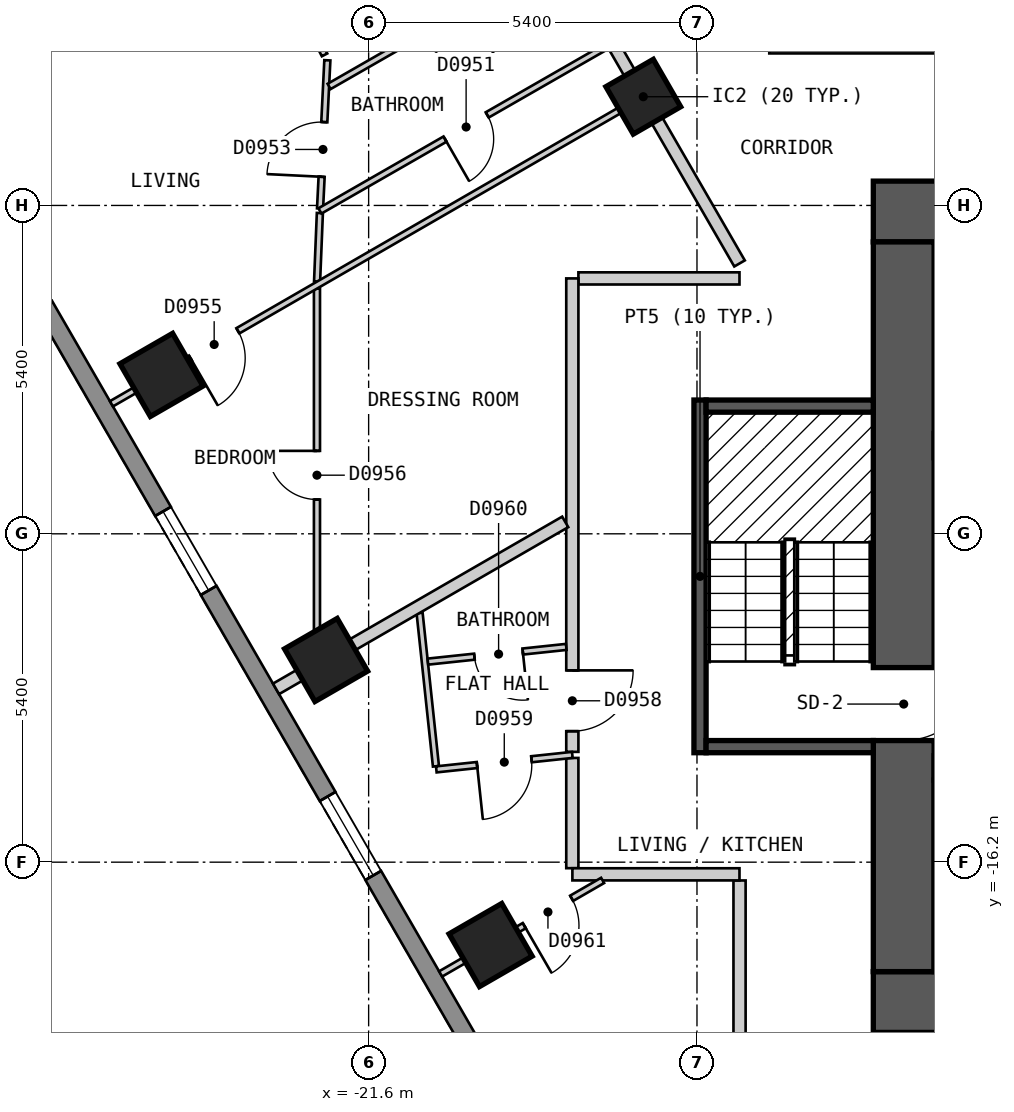
"""IFC4 building model, lengths in metres.
Left out: names, types, materials, properties, quantities, classifications, styles, units other than length and angle.
Written with IfcOpenShell. Run it as: python <this file> out.ifc"""

import sys

from ifc_helpers import new_model, si_unit, direction, frame, frame_2d, origin, origin_2d, place, context, subcontext, project, spatial, polyline, rectangle, outline, extrude, element, fill, save


model = new_model("IFC4")
c1 = context("Model", 3, precision=1e-05, world=origin(), true_north=direction((0.0, 1.0)))
c2 = subcontext(c1, "Body", "Model", "MODEL_VIEW")
j1 = project(units=[si_unit("LENGTHUNIT", "METRE"), si_unit("PLANEANGLEUNIT", "RADIAN")], contexts=[c1])
p1 = place(None, origin())
s1 = spatial("IfcSite", under=j1, at=p1, CompositionType="ELEMENT")
p2 = place(p1, origin())
s2 = spatial("IfcBuilding", under=s1, at=p2, CompositionType="ELEMENT")
p3 = place(p2, frame((0.0, 0.0, 102.0)))
s3 = spatial("IfcBuildingStorey", under=s2, at=p3, CompositionType="ELEMENT", Elevation=102.0)
for number, where, z_axis, x_axis in (
    (1, (-25.007, -8.187, 0.0), (0.0, 0.0, 1.0), (0.5, -0.866, 0.0)),
    (2, (-22.3, -12.875, 0.0), (0.0, 0.0, 1.0), (0.5, -0.866, 0.0)),
    (3, (-19.594, -17.563, 0.0), (0.0, 0.0, 1.0), (0.5, -0.866, 0.0)),
):
    element("IfcColumn", number, at=place(p3, frame(where, z_axis=z_axis, x_axis=x_axis)), inside=s3, PredefinedType="COLUMN", context=c2, shape_type="SweptSolid", body=[
        extrude(rectangle(XDim=1.0, YDim=1.0, at=origin_2d()), origin(), (0.0, 0.0, 1.0), 3.0),
    ])
p4 = place(p3, frame((-17.083, -3.612, 0.0), z_axis=(0.0, 0.0, 1.0), x_axis=(0.5, -0.866025403784, 0.0)))
e4 = element("IfcColumn", 4, at=p4, inside=s3, PredefinedType="COLUMN", context=c2, shape_type="SweptSolid", body=[
    extrude(rectangle(XDim=0.9, YDim=0.9, at=origin_2d()), origin(), (0.0, 0.0, 1.0), 3.0),
])
p5 = place(p3, frame((-13.3, -18.5, 0.0), z_axis=(0.0, 0.0, 1.0), x_axis=(1.0, 0.0, 0.0)))
e5 = element("IfcWall", 5, at=p5, inside=s3, PredefinedType="SHEAR", context=c2, shape_type="SweptSolid", body=[
    extrude(rectangle(XDim=26.6, YDim=1.0, at=frame_2d((13.3, 0.0))), origin(), (0.0, 0.0, 1.0), 2.7),
])
p6 = place(p3, frame((-13.3, -5.5, 0.0), z_axis=(0.0, 0.0, 1.0), x_axis=(1.0, 0.0, 0.0)))
e6 = element("IfcWall", 6, at=p6, inside=s3, PredefinedType="SHEAR", context=c2, shape_type="SweptSolid", body=[
    extrude(rectangle(XDim=26.6, YDim=1.0, at=frame_2d((13.3, 0.0))), origin(), (0.0, 0.0, 1.0), 2.7),
])
p7 = place(p6, frame((23.65, 0.0, 0.0)))
e7 = element("IfcOpeningElement", 7, at=p7, cuts=e6, PredefinedType="OPENING", context=c2, shape_type="SweptSolid", body=[
    extrude(rectangle(XDim=1.2, YDim=2.1, at=frame_2d((0.6, 1.05))), frame((0.0, 0.51, 0.0), z_axis=(0.0, -1.0, 0.0), x_axis=(1.0, 0.0, 0.0)), (0.0, 0.0, 1.0), 1.02),
])
p8 = place(p3, frame((-12.8, -18.0, 0.0), z_axis=(0.0, 0.0, 1.0), x_axis=(0.0, 1.0, 0.0)))
e8 = element("IfcWall", 8, at=p8, inside=s3, PredefinedType="SHEAR", context=c2, shape_type="SweptSolid", body=[
    extrude(rectangle(XDim=12.0, YDim=1.0, at=frame_2d((6.0, 0.0))), origin(), (0.0, 0.0, 1.0), 2.7),
])
p9 = place(p8, frame((3.8, 0.0, 0.0)))
e9 = element("IfcOpeningElement", 9, at=p9, cuts=e8, PredefinedType="OPENING", context=c2, shape_type="SweptSolid", body=[
    extrude(rectangle(XDim=1.2, YDim=2.1, at=frame_2d((0.6, 1.05))), frame((0.0, 0.51, 0.0), z_axis=(0.0, -1.0, 0.0), x_axis=(1.0, 0.0, 0.0)), (0.0, 0.0, 1.0), 1.02),
])
p10 = place(p3, frame((-29.027, -3.425, 0.0), z_axis=(0.0, 0.0, 1.0), x_axis=(0.500035407905, -0.866004960056, 0.0)))
e10 = element("IfcWall", 10, at=p10, inside=s3, PredefinedType="SOLIDWALL", context=c2, shape_type="SweptSolid", body=[
    extrude(outline(polyline([(0.0, -0.15), (23.094, -0.15), (23.014, 0.15), (0.08, 0.15), (0.0, -0.15)])), origin(), (0.0, 0.0, 1.0), 2.7),
])
p11 = place(p10, frame((2.677, 0.0, 0.15)))
e11 = element("IfcOpeningElement", 11, at=p11, cuts=e10, PredefinedType="OPENING", context=c2, shape_type="SweptSolid", body=[
    extrude(rectangle(XDim=1.5, YDim=2.1, at=frame_2d((0.75, 1.05))), frame((0.0, 0.16, 0.0), z_axis=(0.0, -1.0, 0.0), x_axis=(1.0, 0.0, 0.0)), (0.0, 0.0, 1.0), 0.32),
])
p12 = place(p10, frame((8.091, 0.0, 0.15)))
e12 = element("IfcOpeningElement", 12, at=p12, cuts=e10, PredefinedType="OPENING", context=c2, shape_type="SweptSolid", body=[
    extrude(rectangle(XDim=1.5, YDim=2.1, at=frame_2d((0.75, 1.05))), frame((0.0, 0.16, 0.0), z_axis=(0.0, -1.0, 0.0), x_axis=(1.0, 0.0, 0.0)), (0.0, 0.0, 1.0), 0.32),
])
p13 = place(p10, frame((13.504, 0.0, 0.15)))
e13 = element("IfcOpeningElement", 13, at=p13, cuts=e10, PredefinedType="OPENING", context=c2, shape_type="SweptSolid", body=[
    extrude(rectangle(XDim=1.5, YDim=2.1, at=frame_2d((0.75, 1.05))), frame((0.0, 0.16, 0.0), z_axis=(0.0, -1.0, 0.0), x_axis=(1.0, 0.0, 0.0)), (0.0, 0.0, 1.0), 0.32),
])
p14 = place(p10, frame((18.917, 0.0, 0.15)))
e14 = element("IfcOpeningElement", 14, at=p14, cuts=e10, PredefinedType="OPENING", context=c2, shape_type="SweptSolid", body=[
    extrude(rectangle(XDim=1.5, YDim=2.1, at=frame_2d((0.75, 1.05))), frame((0.0, 0.16, 0.0), z_axis=(0.0, -1.0, 0.0), x_axis=(1.0, 0.0, 0.0)), (0.0, 0.0, 1.0), 0.32),
])
p15 = place(p3, frame((-18.533, -1.101, 0.0), z_axis=(0.0, 0.0, 1.0), x_axis=(0.500022085096, -0.866012652573, 0.0)))
e15 = element("IfcWall", 15, at=p15, inside=s3, PredefinedType="PARTITIONING", context=c2, shape_type="SweptSolid", body=[
    extrude(rectangle(XDim=6.066, YDim=0.2, at=frame_2d((3.033, 0.0))), origin(), (0.0, 0.0, 1.0), 2.7),
])
p16 = place(p15, frame((0.532, 0.0, 0.0)))
e16 = element("IfcOpeningElement", 16, at=p16, cuts=e15, PredefinedType="OPENING", context=c2, shape_type="SweptSolid", body=[
    extrude(rectangle(XDim=1.0, YDim=2.1, at=frame_2d((0.5, 1.05))), frame((0.0, 0.11, 0.0), z_axis=(0.0, -1.0, 0.0), x_axis=(1.0, 0.0, 0.0)), (0.0, 0.0, 1.0), 0.22),
])
p17 = place(p3, frame((-15.5, -16.501, 0.0), z_axis=(0.0, 0.0, 1.0), x_axis=(0.0, -1.0, 0.0)))
e17 = element("IfcWall", 17, at=p17, inside=s3, PredefinedType="PARTITIONING", context=c2, shape_type="SweptSolid", body=[
    extrude(rectangle(XDim=4.598, YDim=0.2, at=frame_2d((2.299, 0.0))), origin(), (0.0, 0.0, 1.0), 2.7),
])
p18 = place(p3, frame((-18.25, -14.486, 0.0), z_axis=(0.0, 0.0, 1.0), x_axis=(0.0, -1.0, 0.0)))
e18 = element("IfcWall", 18, at=p18, inside=s3, PredefinedType="PARTITIONING", context=c2, shape_type="SweptSolid", body=[
    extrude(rectangle(XDim=1.813, YDim=0.2, at=frame_2d((0.906, 0.0))), origin(), (0.0, 0.0, 1.0), 2.7),
])
p19 = place(p3, frame((-18.15, -6.6, 0.0), z_axis=(0.0, 0.0, 1.0), x_axis=(1.0, 0.0, 0.0)))
e19 = element("IfcWall", 19, at=p19, inside=s3, PredefinedType="PARTITIONING", context=c2, shape_type="SweptSolid", body=[
    extrude(rectangle(XDim=2.649, YDim=0.2, at=frame_2d((1.324, 0.0))), origin(), (0.0, 0.0, 1.0), 2.7),
])
p20 = place(p3, frame((-18.249, -16.4, 0.0), z_axis=(0.0, 0.0, 1.0), x_axis=(1.0, 0.0, 0.0)))
e20 = element("IfcWall", 20, at=p20, inside=s3, PredefinedType="PARTITIONING", context=c2, shape_type="SweptSolid", body=[
    extrude(rectangle(XDim=2.748, YDim=0.2, at=frame_2d((1.374, 0.0))), origin(), (0.0, 0.0, 1.0), 2.7),
])
p21 = place(p3, frame((-15.011, -2.8, 0.0), z_axis=(0.0, 0.0, 1.0), x_axis=(1.0, 0.0, 0.0)))
e21 = element("IfcWall", 21, at=p21, inside=s3, PredefinedType="PARTITIONING", context=c2, shape_type="SweptSolid", body=[
    extrude(rectangle(XDim=7.982, YDim=0.2, at=frame_2d((3.991, 0.0))), origin(), (0.0, 0.0, 1.0), 2.7),
])
p22 = place(p3, frame((-18.25, -14.386, 0.0), z_axis=(0.0, 0.0, 1.0), x_axis=(0.0, 1.0, 0.0)))
e22 = element("IfcWall", 22, at=p22, inside=s3, PredefinedType="PARTITIONING", context=c2, shape_type="SweptSolid", body=[
    extrude(rectangle(XDim=7.786, YDim=0.2, at=frame_2d((3.893, 0.0))), origin(), (0.0, 0.0, 1.0), 2.7),
])
p23 = place(p22, frame((0.34, 0.0, 0.0)))
e23 = element("IfcOpeningElement", 23, at=p23, cuts=e22, PredefinedType="OPENING", context=c2, shape_type="SweptSolid", body=[
    extrude(rectangle(XDim=1.0, YDim=2.1, at=frame_2d((0.5, 1.05))), frame((0.0, 0.11, 0.0), z_axis=(0.0, -1.0, 0.0), x_axis=(1.0, 0.0, 0.0)), (0.0, 0.0, 1.0), 0.22),
])
p24 = place(p3, frame((-23.289, -1.054, 0.0), z_axis=(0.0, 0.0, 1.0), x_axis=(0.458226112305, -0.888835659726, 0.0)))
e24 = element("IfcWall", 24, at=p24, inside=s3, PredefinedType="PARTITIONING", context=c2, shape_type="SweptSolid", body=[
    extrude(rectangle(XDim=2.104, YDim=0.1, at=frame_2d((1.052, 0.0))), origin(), (0.0, 0.0, 1.0), 2.7),
])
p25 = place(p3, frame((-20.762, -12.102, 0.0), z_axis=(0.0, 0.0, 1.0), x_axis=(0.106118300401, -0.994353511745, 0.0)))
e25 = element("IfcWall", 25, at=p25, inside=s3, PredefinedType="PARTITIONING", context=c2, shape_type="SweptSolid", body=[
    extrude(rectangle(XDim=2.535, YDim=0.1, at=frame_2d((1.268, 0.0))), origin(), (0.0, 0.0, 1.0), 2.7),
])
p26 = place(p3, frame((-20.626, -12.902, 0.0), z_axis=(0.0, 0.0, 1.0), x_axis=(0.994385570266, 0.105817473257, 0.0)))
e26 = element("IfcWall", 26, at=p26, inside=s3, PredefinedType="PARTITIONING", context=c2, shape_type="SweptSolid", body=[
    extrude(rectangle(XDim=2.289, YDim=0.1, at=frame_2d((1.145, 0.0))), origin(), (0.0, 0.0, 1.0), 2.7),
])
p27 = place(p26, frame((0.77, 0.0, 0.0)))
e27 = element("IfcOpeningElement", 27, at=p27, cuts=e26, PredefinedType="OPENING", context=c2, shape_type="SweptSolid", body=[
    extrude(rectangle(XDim=0.8, YDim=2.1, at=frame_2d((0.4, 1.05))), frame((0.0, 0.06, 0.0), z_axis=(0.0, -1.0, 0.0), x_axis=(1.0, 0.0, 0.0)), (0.0, 0.0, 1.0), 0.12),
])
p28 = place(p3, frame((-20.487, -14.674, 0.0), z_axis=(0.0, 0.0, 1.0), x_axis=(0.994386484046, 0.105808885948, 0.0)))
e28 = element("IfcWall", 28, at=p28, inside=s3, PredefinedType="PARTITIONING", context=c2, shape_type="SweptSolid", body=[
    extrude(rectangle(XDim=2.25, YDim=0.1, at=frame_2d((1.125, 0.0))), origin(), (0.0, 0.0, 1.0), 2.7),
])
p29 = place(p28, frame((0.674, 0.0, 0.0)))
e29 = element("IfcOpeningElement", 29, at=p29, cuts=e28, PredefinedType="OPENING", context=c2, shape_type="SweptSolid", body=[
    extrude(rectangle(XDim=0.9, YDim=2.1, at=frame_2d((0.45, 1.05))), frame((0.0, 0.06, 0.0), z_axis=(0.0, -1.0, 0.0), x_axis=(1.0, 0.0, 0.0)), (0.0, 0.0, 1.0), 0.12),
])
p30 = place(p3, frame((-22.399, -5.45, 0.0), z_axis=(0.0, 0.0, 1.0), x_axis=(0.049129140995, 0.998792434646, 0.0)))
e30 = element("IfcWall", 30, at=p30, inside=s3, PredefinedType="PARTITIONING", context=c2, shape_type="SweptSolid", body=[
    extrude(rectangle(XDim=2.44, YDim=0.1, at=frame_2d((1.22, 0.0))), origin(), (0.0, 0.0, 1.0), 2.7),
])
p31 = place(p30, frame((0.522, 0.0, 0.0)))
e31 = element("IfcOpeningElement", 31, at=p31, cuts=e30, PredefinedType="OPENING", context=c2, shape_type="SweptSolid", body=[
    extrude(rectangle(XDim=0.9, YDim=2.1, at=frame_2d((0.45, 1.05))), frame((0.0, 0.06, 0.0), z_axis=(0.0, -1.0, 0.0), x_axis=(1.0, 0.0, 0.0)), (0.0, 0.0, 1.0), 0.12),
])
p32 = place(p3, frame((-22.448, -6.651, 0.0), z_axis=(0.0, 0.0, 1.0), x_axis=(0.040729401597, 0.99917021365, 0.0)))
e32 = element("IfcWall", 32, at=p32, inside=s3, PredefinedType="PARTITIONING", context=c2, shape_type="SweptSolid", body=[
    extrude(rectangle(XDim=1.127, YDim=0.1, at=frame_2d((0.563, 0.0))), origin(), (0.0, 0.0, 1.0), 2.7),
])
p33 = place(p3, frame((-22.45, -12.846, 0.0), z_axis=(0.0, 0.0, 1.0), x_axis=(0.0, 1.0, 0.0)))
e33 = element("IfcWall", 33, at=p33, inside=s3, PredefinedType="PARTITIONING", context=c2, shape_type="SweptSolid", body=[
    extrude(rectangle(XDim=6.078, YDim=0.1, at=frame_2d((3.039, 0.0))), origin(), (0.0, 0.0, 1.0), 2.7),
])
p34 = place(p33, frame((2.61, 0.0, 0.0)))
e34 = element("IfcOpeningElement", 34, at=p34, cuts=e33, PredefinedType="OPENING", context=c2, shape_type="SweptSolid", body=[
    extrude(rectangle(XDim=0.8, YDim=2.1, at=frame_2d((0.4, 1.05))), frame((0.0, 0.06, 0.0), z_axis=(0.0, -1.0, 0.0), x_axis=(1.0, 0.0, 0.0)), (0.0, 0.0, 1.0), 0.12),
])
p35 = place(p3, frame((-20.416, -18.038, 0.0), z_axis=(0.0, 0.0, 1.0), x_axis=(0.866026989333, 0.499997253739, 0.0)))
e35 = element("IfcWall", 35, at=p35, inside=s3, PredefinedType="PARTITIONING", context=c2, shape_type="SweptSolid", body=[
    extrude(rectangle(XDim=3.076, YDim=0.1, at=frame_2d((1.538, 0.0))), origin(), (0.0, 0.0, 1.0), 2.7),
])
p36 = place(p35, frame((1.588, 0.0, 0.0)))
e36 = element("IfcOpeningElement", 36, at=p36, cuts=e35, PredefinedType="OPENING", context=c2, shape_type="SweptSolid", body=[
    extrude(rectangle(XDim=0.9, YDim=2.1, at=frame_2d((0.45, 1.05))), frame((0.0, 0.06, 0.0), z_axis=(0.0, -1.0, 0.0), x_axis=(1.0, 0.0, 0.0)), (0.0, 0.0, 1.0), 0.12),
])
p37 = place(p3, frame((-25.83, -8.662, 0.0), z_axis=(0.0, 0.0, 1.0), x_axis=(0.866022959057, 0.500004234368, 0.0)))
e37 = element("IfcWall", 37, at=p37, inside=s3, PredefinedType="PARTITIONING", context=c2, shape_type="SweptSolid", body=[
    extrude(rectangle(XDim=10.0, YDim=0.1, at=frame_2d((5.0, 0.0))), origin(), (0.0, 0.0, 1.0), 2.7),
])
p38 = place(p37, frame((1.501, 0.0, 0.0)))
e38 = element("IfcOpeningElement", 38, at=p38, cuts=e37, PredefinedType="OPENING", context=c2, shape_type="SweptSolid", body=[
    extrude(rectangle(XDim=0.9, YDim=2.1, at=frame_2d((0.45, 1.05))), frame((0.0, 0.06, 0.0), z_axis=(0.0, -1.0, 0.0), x_axis=(1.0, 0.0, 0.0)), (0.0, 0.0, 1.0), 0.12),
])
p39 = place(p3, frame((-22.401, -5.49, 0.0), z_axis=(0.0, 0.0, 1.0), x_axis=(0.867314404256, 0.497760709749, 0.0)))
e39 = element("IfcWall", 39, at=p39, inside=s3, PredefinedType="PARTITIONING", context=c2, shape_type="SweptSolid", body=[
    extrude(rectangle(XDim=5.444, YDim=0.1, at=frame_2d((2.722, 0.0))), origin(), (0.0, 0.0, 1.0), 2.7),
])
p40 = place(p39, frame((2.372, 0.0, 0.0)))
e40 = element("IfcOpeningElement", 40, at=p40, cuts=e39, PredefinedType="OPENING", context=c2, shape_type="SweptSolid", body=[
    extrude(rectangle(XDim=0.8, YDim=2.1, at=frame_2d((0.4, 1.05))), frame((0.0, 0.06, 0.0), z_axis=(0.0, -1.0, 0.0), x_axis=(1.0, 0.0, 0.0)), (0.0, 0.0, 1.0), 0.12),
])
p41 = place(p3, frame((-22.25, -3.443, 0.0), z_axis=(0.0, 0.0, 1.0), x_axis=(0.867362741349, 0.497676476156, 0.0)))
e41 = element("IfcWall", 41, at=p41, inside=s3, PredefinedType="PARTITIONING", context=c2, shape_type="SweptSolid", body=[
    extrude(rectangle(XDim=4.29, YDim=0.1, at=frame_2d((2.145, 0.0))), origin(), (0.0, 0.0, 1.0), 2.7),
])
p42 = place(p41, frame((1.715, 0.0, 0.0)))
e42 = element("IfcOpeningElement", 42, at=p42, cuts=e41, PredefinedType="OPENING", context=c2, shape_type="SweptSolid", body=[
    extrude(rectangle(XDim=0.9, YDim=2.1, at=frame_2d((0.45, 1.05))), frame((0.0, 0.06, 0.0), z_axis=(0.0, -1.0, 0.0), x_axis=(1.0, 0.0, 0.0)), (0.0, 0.0, 1.0), 0.12),
])
p43 = place(p3, frame((-23.123, -13.35, 0.0), z_axis=(0.0, 0.0, 1.0), x_axis=(0.866013095437, 0.500021318078, 0.0)))
e43 = element("IfcWall", 43, at=p43, inside=s3, PredefinedType="PARTITIONING", context=c2, shape_type="SweptSolid", body=[
    extrude(rectangle(XDim=5.492, YDim=0.2, at=frame_2d((2.746, 0.0))), origin(), (0.0, 0.0, 1.0), 2.7),
])
p44 = place(p3, frame((-16.15, -14.4, 0.0), z_axis=(0.0, 0.0, 1.0), x_axis=(0.0, 1.0, 0.0)))
e44 = element("IfcWall", 44, at=p44, inside=s3, PredefinedType="SOLIDWALL", context=c2, shape_type="SweptSolid", body=[
    extrude(rectangle(XDim=5.8, YDim=0.2, at=frame_2d((2.9, 0.0))), origin(), (0.0, 0.0, 1.0), 2.7),
])
for number, where, z_axis, x_axis in (
    (45, (-16.05, -14.3, 0.0), (0.0, 0.0, 1.0), (1.0, 0.0, 0.0)),
    (46, (-16.05, -8.7, 0.0), (0.0, 0.0, 1.0), (1.0, 0.0, 0.0)),
):
    element("IfcWall", number, at=place(p3, frame(where, z_axis=z_axis, x_axis=x_axis)), inside=s3, PredefinedType="SOLIDWALL", context=c2, shape_type="SweptSolid", body=[
        extrude(rectangle(XDim=2.75, YDim=0.2, at=frame_2d((1.375, 0.0))), origin(), (0.0, 0.0, 1.0), 2.7),
    ])
p45 = place(p12, origin())
e47 = element("IfcWindow", 47, at=p45, inside=s3, PartitioningType="SINGLE_PANEL", PredefinedType="WINDOW", context=c2, shape_type="SweptSolid", body=[
    extrude(rectangle(XDim=1.5, YDim=2.1, at=frame_2d((0.75, 1.05))), frame((0.0, 0.03, 0.0), z_axis=(0.0, -1.0, 0.0), x_axis=(1.0, 0.0, 0.0)), (0.0, 0.0, 1.0), 0.06),
])
fill(e12, e47)
p46 = place(p13, origin())
e48 = element("IfcWindow", 48, at=p46, inside=s3, PartitioningType="SINGLE_PANEL", PredefinedType="WINDOW", context=c2, shape_type="SweptSolid", body=[
    extrude(rectangle(XDim=1.5, YDim=2.1, at=frame_2d((0.75, 1.05))), frame((0.0, 0.03, 0.0), z_axis=(0.0, -1.0, 0.0), x_axis=(1.0, 0.0, 0.0)), (0.0, 0.0, 1.0), 0.06),
])
fill(e13, e48)
p47 = place(p40, origin())
e49 = element("IfcDoor", 49, at=p47, inside=s3, OperationType="SINGLE_SWING_LEFT", PredefinedType="DOOR", context=c2, shape_type="SweptSolid", body=[
    extrude(rectangle(XDim=0.8, YDim=2.1, at=frame_2d((0.4, 1.05))), frame((0.0, 0.025, 0.0), z_axis=(0.0, -1.0, 0.0), x_axis=(1.0, 0.0, 0.0)), (0.0, 0.0, 1.0), 0.05),
])
fill(e40, e49)
p48 = place(p31, origin())
e50 = element("IfcDoor", 50, at=p48, inside=s3, OperationType="SINGLE_SWING_LEFT", PredefinedType="DOOR", context=c2, shape_type="SweptSolid", body=[
    extrude(rectangle(XDim=0.9, YDim=2.1, at=frame_2d((0.45, 1.05))), frame((0.0, 0.025, 0.0), z_axis=(0.0, -1.0, 0.0), x_axis=(1.0, 0.0, 0.0)), (0.0, 0.0, 1.0), 0.05),
])
fill(e31, e50)
p49 = place(p38, origin())
e51 = element("IfcDoor", 51, at=p49, inside=s3, OperationType="SINGLE_SWING_LEFT", PredefinedType="DOOR", context=c2, shape_type="SweptSolid", body=[
    extrude(rectangle(XDim=0.9, YDim=2.1, at=frame_2d((0.45, 1.05))), frame((0.0, 0.025, 0.0), z_axis=(0.0, -1.0, 0.0), x_axis=(1.0, 0.0, 0.0)), (0.0, 0.0, 1.0), 0.05),
])
fill(e38, e51)
p50 = place(p34, origin())
e52 = element("IfcDoor", 52, at=p50, inside=s3, OperationType="SINGLE_SWING_RIGHT", PredefinedType="DOOR", context=c2, shape_type="SweptSolid", body=[
    extrude(rectangle(XDim=0.8, YDim=2.1, at=frame_2d((0.4, 1.05))), frame((0.0, 0.025, 0.0), z_axis=(0.0, -1.0, 0.0), x_axis=(1.0, 0.0, 0.0)), (0.0, 0.0, 1.0), 0.05),
])
fill(e34, e52)
p51 = place(p23, origin())
e53 = element("IfcDoor", 53, at=p51, inside=s3, OperationType="SINGLE_SWING_RIGHT", PredefinedType="DOOR", context=c2, shape_type="SweptSolid", body=[
    extrude(rectangle(XDim=1.0, YDim=2.1, at=frame_2d((0.5, 1.05))), frame((0.0, 0.025, 0.0), z_axis=(0.0, -1.0, 0.0), x_axis=(1.0, 0.0, 0.0)), (0.0, 0.0, 1.0), 0.05),
])
fill(e23, e53)
p52 = place(p29, origin())
e54 = element("IfcDoor", 54, at=p52, inside=s3, OperationType="SINGLE_SWING_LEFT", PredefinedType="DOOR", context=c2, shape_type="SweptSolid", body=[
    extrude(rectangle(XDim=0.9, YDim=2.1, at=frame_2d((0.45, 1.05))), frame((0.0, 0.025, 0.0), z_axis=(0.0, -1.0, 0.0), x_axis=(1.0, 0.0, 0.0)), (0.0, 0.0, 1.0), 0.05),
])
fill(e29, e54)
p53 = place(p27, origin())
e55 = element("IfcDoor", 55, at=p53, inside=s3, OperationType="SINGLE_SWING_RIGHT", PredefinedType="DOOR", context=c2, shape_type="SweptSolid", body=[
    extrude(rectangle(XDim=0.8, YDim=2.1, at=frame_2d((0.4, 1.05))), frame((0.0, 0.025, 0.0), z_axis=(0.0, -1.0, 0.0), x_axis=(1.0, 0.0, 0.0)), (0.0, 0.0, 1.0), 0.05),
])
fill(e27, e55)
p54 = place(p36, origin())
e56 = element("IfcDoor", 56, at=p54, inside=s3, OperationType="SINGLE_SWING_LEFT", PredefinedType="DOOR", context=c2, shape_type="SweptSolid", body=[
    extrude(rectangle(XDim=0.9, YDim=2.1, at=frame_2d((0.45, 1.05))), frame((0.0, 0.025, 0.0), z_axis=(0.0, -1.0, 0.0), x_axis=(1.0, 0.0, 0.0)), (0.0, 0.0, 1.0), 0.05),
])
fill(e36, e56)
p55 = place(p9, origin())
e57 = element("IfcDoor", 57, at=p55, inside=s3, OperationType="SINGLE_SWING_RIGHT", PredefinedType="DOOR", context=c2, shape_type="SweptSolid", body=[
    extrude(rectangle(XDim=1.2, YDim=2.1, at=frame_2d((0.6, 1.05))), frame((0.0, 0.025, 0.0), z_axis=(0.0, -1.0, 0.0), x_axis=(1.0, 0.0, 0.0)), (0.0, 0.0, 1.0), 0.05),
])
fill(e9, e57)
save(model, sys.argv[1])
